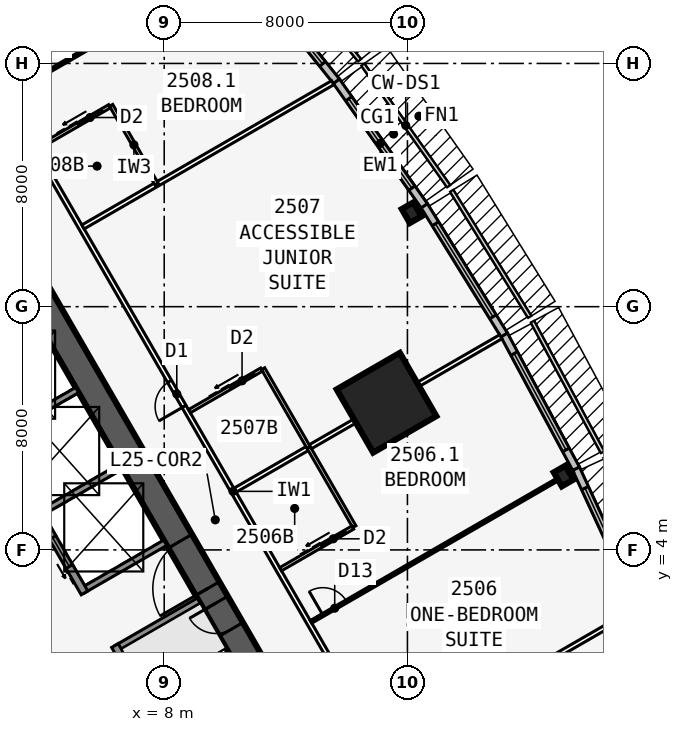
"""IFC4 building model, lengths in metres.
Left out: names, types, materials, properties, quantities, classifications, styles, units other than length and angle.
Written with IfcOpenShell. Run it as: python <this file> out.ifc"""

import sys

from ifc_helpers import new_model, si_unit, direction, frame, frame_2d, origin, origin_2d, place, context, subcontext, project, spatial, rectangle, i_section, extrude, element, fill, save


model = new_model("IFC4")
c1 = context("Model", 3, precision=1e-05, world=origin(), true_north=direction((0.0, 1.0)))
c2 = subcontext(c1, "Body", "Model", "MODEL_VIEW")
j1 = project(units=[si_unit("LENGTHUNIT", "METRE"), si_unit("PLANEANGLEUNIT", "RADIAN")], contexts=[c1])
p1 = place(None, origin())
s1 = spatial("IfcSite", under=j1, at=p1, CompositionType="ELEMENT")
p2 = place(p1, origin())
s2 = spatial("IfcBuilding", under=s1, at=p2, CompositionType="ELEMENT")
p3 = place(p2, frame((0.0, 0.0, 96.5)))
s3 = spatial("IfcBuildingStorey", under=s2, at=p3, CompositionType="ELEMENT", Elevation=96.5)
p4 = place(p3, frame((16.5, -9.526, 0.0), z_axis=(0.0, 0.0, 1.0), x_axis=(-0.499999749417, 0.866025548458, 0.0)))
e1 = element("IfcWall", 1, at=p4, inside=s3, PredefinedType="SHEAR", context=c2, shape_type="SweptSolid", body=[
    extrude(rectangle(XDim=33.0, YDim=0.9, at=frame_2d((16.5, 0.0))), origin(), (0.0, 0.0, 1.0), 3.4),
])
p5 = place(p4, frame((14.15, 0.0, 0.0)))
e2 = element("IfcOpeningElement", 2, at=p5, cuts=e1, PredefinedType="OPENING", context=c2, shape_type="SweptSolid", body=[
    extrude(rectangle(XDim=1.8, YDim=2.13, at=frame_2d((0.9, 1.065))), frame((0.0, 0.46, 0.0), z_axis=(0.0, -1.0, 0.0), x_axis=(1.0, 0.0, 0.0)), (0.0, 0.0, 1.0), 0.92),
])
p6 = place(p4, frame((12.6, 0.0, 0.0)))
e3 = element("IfcOpeningElement", 3, at=p6, cuts=e1, PredefinedType="OPENING", context=c2, shape_type="SweptSolid", body=[
    extrude(rectangle(XDim=1.0, YDim=2.13, at=frame_2d((0.5, 1.065))), frame((0.0, 0.46, 0.0), z_axis=(0.0, -1.0, 0.0), x_axis=(1.0, 0.0, 0.0)), (0.0, 0.0, 1.0), 0.92),
])
p7 = place(p3, frame((10.245, -5.843, 0.0), z_axis=(0.0, 0.0, 1.0), x_axis=(-0.499993009313, 0.866029439822, 0.0)))
e4 = element("IfcWall", 4, at=p7, inside=s3, PredefinedType="SOLIDWALL", context=c2, shape_type="SweptSolid", body=[
    extrude(rectangle(XDim=7.733, YDim=0.25, at=frame_2d((3.866, 0.0))), origin(), (0.0, 0.0, 1.0), 3.235),
])
p8 = place(p3, frame((5.379, 2.586, 0.0), z_axis=(0.0, 0.0, 1.0), x_axis=(-0.500001375892, 0.866024609411, 0.0)))
e5 = element("IfcWall", 5, at=p8, inside=s3, PredefinedType="SOLIDWALL", context=c2, shape_type="SweptSolid", body=[
    extrude(rectangle(XDim=10.633, YDim=0.25, at=frame_2d((5.316, 0.0))), origin(), (0.0, 0.0, 1.0), 3.235),
])
p9 = place(p8, frame((9.164, 0.0, 0.0)))
e6 = element("IfcOpeningElement", 6, at=p9, cuts=e5, PredefinedType="OPENING", context=c2, shape_type="SweptSolid", body=[
    extrude(rectangle(XDim=0.9, YDim=2.13, at=frame_2d((0.45, 1.065))), frame((0.0, 0.135, 0.0), z_axis=(0.0, -1.0, 0.0), x_axis=(1.0, 0.0, 0.0)), (0.0, 0.0, 1.0), 0.27),
])
p10 = place(p8, frame((1.0, 0.0, 0.0)))
e7 = element("IfcOpeningElement", 7, at=p10, cuts=e5, PredefinedType="OPENING", context=c2, shape_type="SweptSolid", body=[
    extrude(rectangle(XDim=1.1, YDim=2.13, at=frame_2d((0.55, 1.065))), frame((0.0, 0.135, 0.0), z_axis=(0.0, -1.0, 0.0), x_axis=(1.0, 0.0, 0.0)), (0.0, 0.0, 1.0), 0.27),
])
p11 = place(p8, frame((3.9, 0.0, 0.0)))
e8 = element("IfcOpeningElement", 8, at=p11, cuts=e5, PredefinedType="OPENING", context=c2, shape_type="SweptSolid", body=[
    extrude(rectangle(XDim=1.1, YDim=2.13, at=frame_2d((0.55, 1.065))), frame((0.0, 0.135, 0.0), z_axis=(0.0, -1.0, 0.0), x_axis=(1.0, 0.0, 0.0)), (0.0, 0.0, 1.0), 0.27),
])
p12 = place(p8, frame((6.8, 0.0, 0.0)))
e9 = element("IfcOpeningElement", 9, at=p12, cuts=e5, PredefinedType="OPENING", context=c2, shape_type="SweptSolid", body=[
    extrude(rectangle(XDim=1.1, YDim=2.13, at=frame_2d((0.55, 1.065))), frame((0.0, 0.135, 0.0), z_axis=(0.0, -1.0, 0.0), x_axis=(1.0, 0.0, 0.0)), (0.0, 0.0, 1.0), 0.27),
])
for number, where, z_axis, x_axis in (
    (10, (6.429, 0.767, 0.0), (0.0, 0.0, 1.0), (0.866, 0.5, 0.0)),
    (11, (5.329, 2.673, 0.0), (0.0, 0.0, 1.0), (0.866, 0.5, 0.0)),
    (12, (3.879, 5.184, 0.0), (0.0, 0.0, 1.0), (0.866, 0.5, 0.0)),
    (13, (2.429, 7.696, 0.0), (0.0, 0.0, 1.0), (0.866, 0.5, 0.0)),
):
    element("IfcWall", number, at=place(p3, frame(where, z_axis=z_axis, x_axis=x_axis)), inside=s3, PredefinedType="SOLIDWALL", context=c2, shape_type="SweptSolid", body=[
        extrude(rectangle(XDim=3.125, YDim=0.2, at=frame_2d((1.562, 0.0))), origin(), (0.0, 0.0, 1.0), 3.235),
    ])
for number, where, z_axis, x_axis in (
    (14, (21.137, 6.43, 0.0), (0.0, 0.0, 1.0), (0.866, 0.5, 0.0)),
    (15, (16.137, 15.09, 0.0), (0.0, 0.0, 1.0), (0.866, 0.5, 0.0)),
):
    element("IfcColumn", number, at=place(p3, frame(where, z_axis=z_axis, x_axis=x_axis)), inside=s3, PredefinedType="COLUMN", context=c2, shape_type="SweptSolid", body=[
        extrude(i_section(OverallWidth=0.442, OverallDepth=0.531, WebThickness=0.066, FlangeThickness=0.106, at=origin_2d()), origin(), (0.0, 0.0, 1.0), 3.4),
    ])
p13 = place(p3, frame((15.312, 8.84, 0.0), z_axis=(0.0, 0.0, 1.0), x_axis=(0.866025403784, 0.5, 0.0)))
e16 = element("IfcColumn", 16, at=p13, inside=s3, PredefinedType="COLUMN", context=c2, shape_type="SweptSolid", body=[
    extrude(rectangle(XDim=2.4, YDim=2.4, at=origin_2d()), origin(), (0.0, 0.0, 1.0), 3.4),
])
p14 = place(p3, frame((23.648, 2.119, 0.0), z_axis=(0.0, 0.0, 1.0), x_axis=(-0.419203100754, 0.907892482796, 0.0)))
e17 = element("IfcWall", 17, at=p14, inside=s3, PredefinedType="STANDARD", context=c2, shape_type="SweptSolid", body=[
    extrude(rectangle(XDim=5.021, YDim=0.25, at=frame_2d((2.51, 0.0))), origin(), (0.0, 0.0, 1.0), 3.235),
])
p15 = place(p14, frame((0.71, 0.0, 0.45)))
e18 = element("IfcOpeningElement", 18, at=p15, cuts=e17, PredefinedType="OPENING", context=c2, shape_type="SweptSolid", body=[
    extrude(rectangle(XDim=3.6, YDim=2.4, at=frame_2d((1.8, 1.2))), frame((0.0, 0.135, 0.0), z_axis=(0.0, -1.0, 0.0), x_axis=(1.0, 0.0, 0.0)), (0.0, 0.0, 1.0), 0.27),
])
p16 = place(p3, frame((21.547, 6.671, 0.0), z_axis=(0.0, 0.0, 1.0), x_axis=(-0.473412820489, 0.880840678782, 0.0)))
e19 = element("IfcWall", 19, at=p16, inside=s3, PredefinedType="STANDARD", context=c2, shape_type="SweptSolid", body=[
    extrude(rectangle(XDim=5.002, YDim=0.25, at=frame_2d((2.501, 0.0))), origin(), (0.0, 0.0, 1.0), 3.235),
])
p17 = place(p16, frame((0.701, 0.0, 0.45)))
e20 = element("IfcOpeningElement", 20, at=p17, cuts=e19, PredefinedType="OPENING", context=c2, shape_type="SweptSolid", body=[
    extrude(rectangle(XDim=3.6, YDim=2.4, at=frame_2d((1.8, 1.2))), frame((0.0, 0.135, 0.0), z_axis=(0.0, -1.0, 0.0), x_axis=(1.0, 0.0, 0.0)), (0.0, 0.0, 1.0), 0.27),
])
p18 = place(p3, frame((19.182, 11.071, 0.0), z_axis=(0.0, 0.0, 1.0), x_axis=(-0.526132807704, 0.850402415717, 0.0)))
e21 = element("IfcWall", 21, at=p18, inside=s3, PredefinedType="STANDARD", context=c2, shape_type="SweptSolid", body=[
    extrude(rectangle(XDim=5.002, YDim=0.25, at=frame_2d((2.501, 0.0))), origin(), (0.0, 0.0, 1.0), 3.235),
])
p19 = place(p18, frame((0.701, 0.0, 0.45)))
e22 = element("IfcOpeningElement", 22, at=p19, cuts=e21, PredefinedType="OPENING", context=c2, shape_type="SweptSolid", body=[
    extrude(rectangle(XDim=3.6, YDim=2.4, at=frame_2d((1.8, 1.2))), frame((0.0, 0.135, 0.0), z_axis=(0.0, -1.0, 0.0), x_axis=(1.0, 0.0, 0.0)), (0.0, 0.0, 1.0), 0.27),
])
p20 = place(p3, frame((16.555, 15.318, 0.0), z_axis=(0.0, 0.0, 1.0), x_axis=(-0.5766431066, 0.81699616132, 0.0)))
e23 = element("IfcWall", 23, at=p20, inside=s3, PredefinedType="STANDARD", context=c2, shape_type="SweptSolid", body=[
    extrude(rectangle(XDim=5.021, YDim=0.25, at=frame_2d((2.51, 0.0))), origin(), (0.0, 0.0, 1.0), 3.235),
])
p21 = place(p20, frame((0.71, 0.0, 0.45)))
e24 = element("IfcOpeningElement", 24, at=p21, cuts=e23, PredefinedType="OPENING", context=c2, shape_type="SweptSolid", body=[
    extrude(rectangle(XDim=3.6, YDim=2.4, at=frame_2d((1.8, 1.2))), frame((0.0, 0.135, 0.0), z_axis=(0.0, -1.0, 0.0), x_axis=(1.0, 0.0, 0.0)), (0.0, 0.0, 1.0), 0.27),
])
p22 = place(p3, frame((13.664, 19.414, 0.0), z_axis=(0.0, 0.0, 1.0), x_axis=(-0.624594965756, 0.780948864364, 0.0)))
e25 = element("IfcWall", 25, at=p22, inside=s3, PredefinedType="STANDARD", context=c2, shape_type="SweptSolid", body=[
    extrude(rectangle(XDim=5.058, YDim=0.25, at=frame_2d((2.529, 0.0))), origin(), (0.0, 0.0, 1.0), 3.235),
])
p23 = place(p22, frame((0.729, 0.0, 0.45)))
e26 = element("IfcOpeningElement", 26, at=p23, cuts=e25, PredefinedType="OPENING", context=c2, shape_type="SweptSolid", body=[
    extrude(rectangle(XDim=3.6, YDim=2.4, at=frame_2d((1.8, 1.2))), frame((0.0, 0.135, 0.0), z_axis=(0.0, -1.0, 0.0), x_axis=(1.0, 0.0, 0.0)), (0.0, 0.0, 1.0), 0.27),
])
p24 = place(p3, frame((20.027, -10.985, 0.0), z_axis=(0.0, 0.0, 1.0), x_axis=(-0.500001677587, 0.866024435227, 0.0)))
e27 = element("IfcWall", 27, at=p24, inside=s3, PredefinedType="PARTITIONING", context=c2, shape_type="SweptSolid", body=[
    extrude(rectangle(XDim=39.054, YDim=0.15, at=frame_2d((19.527, 0.0))), origin(), (0.0, 0.0, 1.0), 3.235),
])
p25 = place(p24, frame((1.558, 0.0, 0.0)))
e28 = element("IfcOpeningElement", 28, at=p25, cuts=e27, PredefinedType="OPENING", context=c2, shape_type="SweptSolid", body=[
    extrude(rectangle(XDim=0.95, YDim=2.13, at=frame_2d((0.475, 1.065))), frame((0.0, 0.085, 0.0), z_axis=(0.0, -1.0, 0.0), x_axis=(1.0, 0.0, 0.0)), (0.0, 0.0, 1.0), 0.17),
])
p26 = place(p24, frame((11.552, 0.0, 0.0)))
e29 = element("IfcOpeningElement", 29, at=p26, cuts=e27, PredefinedType="OPENING", context=c2, shape_type="SweptSolid", body=[
    extrude(rectangle(XDim=0.95, YDim=2.13, at=frame_2d((0.475, 1.065))), frame((0.0, 0.085, 0.0), z_axis=(0.0, -1.0, 0.0), x_axis=(1.0, 0.0, 0.0)), (0.0, 0.0, 1.0), 0.17),
])
p27 = place(p24, frame((22.752, 0.0, 0.0)))
e30 = element("IfcOpeningElement", 30, at=p27, cuts=e27, PredefinedType="OPENING", context=c2, shape_type="SweptSolid", body=[
    extrude(rectangle(XDim=0.95, YDim=2.13, at=frame_2d((0.475, 1.065))), frame((0.0, 0.085, 0.0), z_axis=(0.0, -1.0, 0.0), x_axis=(1.0, 0.0, 0.0)), (0.0, 0.0, 1.0), 0.17),
])
p28 = place(p24, frame((36.546, 0.0, 0.0)))
e31 = element("IfcOpeningElement", 31, at=p28, cuts=e27, PredefinedType="OPENING", context=c2, shape_type="SweptSolid", body=[
    extrude(rectangle(XDim=0.95, YDim=2.13, at=frame_2d((0.475, 1.065))), frame((0.0, 0.085, 0.0), z_axis=(0.0, -1.0, 0.0), x_axis=(1.0, 0.0, 0.0)), (0.0, 0.0, 1.0), 0.17),
])
p29 = place(p3, frame((15.329, -2.697, 0.0), z_axis=(0.0, 0.0, 1.0), x_axis=(0.866018409083, 0.500012114982, 0.0)))
e32 = element("IfcWall", 32, at=p29, inside=s3, PredefinedType="PARTITIONING", context=c2, shape_type="SweptSolid", body=[
    extrude(rectangle(XDim=9.485, YDim=0.15, at=frame_2d((4.742, 0.0))), origin(), (0.0, 0.0, 1.0), 2.389),
])
p30 = place(p3, frame((12.829, 1.633, 0.0), z_axis=(0.0, 0.0, 1.0), x_axis=(0.866026934769, 0.499997348248, 0.0)))
e33 = element("IfcWall", 33, at=p30, inside=s3, PredefinedType="PARTITIONING", context=c2, shape_type="SweptSolid", body=[
    extrude(rectangle(XDim=9.943, YDim=0.1, at=frame_2d((4.971, 0.0))), origin(), (0.0, 0.0, 1.0), 2.389),
])
p31 = place(p30, frame((0.45, 0.0, 0.0)))
e34 = element("IfcOpeningElement", 34, at=p31, cuts=e33, PredefinedType="OPENING", context=c2, shape_type="SweptSolid", body=[
    extrude(rectangle(XDim=0.9, YDim=2.13, at=frame_2d((0.45, 1.065))), frame((0.0, 0.06, 0.0), z_axis=(0.0, -1.0, 0.0), x_axis=(1.0, 0.0, 0.0)), (0.0, 0.0, 1.0), 0.12),
])
p32 = place(p3, frame((10.329, 5.963, 0.0), z_axis=(0.0, 0.0, 1.0), x_axis=(0.866021688545, 0.500006434927, 0.0)))
e35 = element("IfcWall", 35, at=p32, inside=s3, PredefinedType="PARTITIONING", context=c2, shape_type="SweptSolid", body=[
    extrude(rectangle(XDim=10.096, YDim=0.15, at=frame_2d((5.048, 0.0))), origin(), (0.0, 0.0, 1.0), 2.389),
])
p33 = place(p3, frame((5.329, 14.623, 0.0), z_axis=(0.0, 0.0, 1.0), x_axis=(0.866018409083, 0.500012114982, 0.0)))
e36 = element("IfcWall", 36, at=p33, inside=s3, PredefinedType="PARTITIONING", context=c2, shape_type="SweptSolid", body=[
    extrude(rectangle(XDim=9.485, YDim=0.15, at=frame_2d((4.742, 0.0))), origin(), (0.0, 0.0, 1.0), 2.389),
])
p34 = place(p3, frame((2.829, 18.954, 0.0), z_axis=(0.0, 0.0, 1.0), x_axis=(0.866020536561, 0.500008430184, 0.0)))
e37 = element("IfcWall", 37, at=p34, inside=s3, PredefinedType="PARTITIONING", context=c2, shape_type="SweptSolid", body=[
    extrude(rectangle(XDim=8.72, YDim=0.1, at=frame_2d((4.36, 0.0))), origin(), (0.0, 0.0, 1.0), 2.389),
])
p35 = place(p34, frame((0.45, 0.0, 0.0)))
e38 = element("IfcOpeningElement", 38, at=p35, cuts=e37, PredefinedType="OPENING", context=c2, shape_type="SweptSolid", body=[
    extrude(rectangle(XDim=0.9, YDim=2.13, at=frame_2d((0.45, 1.065))), frame((0.0, 0.06, 0.0), z_axis=(0.0, -1.0, 0.0), x_axis=(1.0, 0.0, 0.0)), (0.0, 0.0, 1.0), 0.12),
])
p36 = place(p3, frame((14.253, 4.765, 0.0), z_axis=(0.0, 0.0, 1.0), x_axis=(-0.50002537861, 0.866010750942, 0.0)))
e39 = element("IfcWall", 39, at=p36, inside=s3, PredefinedType="PLUMBINGWALL", context=c2, shape_type="SweptSolid", body=[
    extrude(rectangle(XDim=3.0, YDim=0.12, at=frame_2d((1.5, 0.0))), origin(), (0.0, 0.0, 1.0), 3.235),
])
p37 = place(p3, frame((11.829, 3.365, 0.0), z_axis=(0.0, 0.0, 1.0), x_axis=(0.865997131366, 0.500048966069, 0.0)))
e40 = element("IfcWall", 40, at=p37, inside=s3, PredefinedType="PLUMBINGWALL", context=c2, shape_type="SweptSolid", body=[
    extrude(rectangle(XDim=2.74, YDim=0.12, at=frame_2d((1.37, 0.0))), origin(), (0.0, 0.0, 1.0), 3.235),
])
p38 = place(p37, frame((1.55, 0.0, 0.0)))
e41 = element("IfcOpeningElement", 41, at=p38, cuts=e40, PredefinedType="OPENING", context=c2, shape_type="SweptSolid", body=[
    extrude(rectangle(XDim=0.9, YDim=2.13, at=frame_2d((0.45, 1.065))), frame((0.0, 0.07, 0.0), z_axis=(0.0, -1.0, 0.0), x_axis=(1.0, 0.0, 0.0)), (0.0, 0.0, 1.0), 0.14),
])
p39 = place(p3, frame((12.753, 7.363, 0.0), z_axis=(0.0, 0.0, 1.0), x_axis=(-0.499990139034, 0.866031096941, 0.0)))
e42 = element("IfcWall", 42, at=p39, inside=s3, PredefinedType="PLUMBINGWALL", context=c2, shape_type="SweptSolid", body=[
    extrude(rectangle(XDim=3.0, YDim=0.12, at=frame_2d((1.5, 0.0))), origin(), (0.0, 0.0, 1.0), 3.235),
])
p40 = place(p3, frame((8.829, 8.561, 0.0), z_axis=(0.0, 0.0, 1.0), x_axis=(0.866035715982, 0.499982138324, 0.0)))
e43 = element("IfcWall", 43, at=p40, inside=s3, PredefinedType="PLUMBINGWALL", context=c2, shape_type="SweptSolid", body=[
    extrude(rectangle(XDim=2.74, YDim=0.12, at=frame_2d((1.37, 0.0))), origin(), (0.0, 0.0, 1.0), 3.235),
])
p41 = place(p40, frame((1.55, 0.0, 0.0)))
e44 = element("IfcOpeningElement", 44, at=p41, cuts=e43, PredefinedType="OPENING", context=c2, shape_type="SweptSolid", body=[
    extrude(rectangle(XDim=0.9, YDim=2.13, at=frame_2d((0.45, 1.065))), frame((0.0, 0.07, 0.0), z_axis=(0.0, -1.0, 0.0), x_axis=(1.0, 0.0, 0.0)), (0.0, 0.0, 1.0), 0.14),
])
p42 = place(p3, frame((7.753, 16.023, 0.0), z_axis=(0.0, 0.0, 1.0), x_axis=(-0.499990139034, 0.866031096941, 0.0)))
e45 = element("IfcWall", 45, at=p42, inside=s3, PredefinedType="PLUMBINGWALL", context=c2, shape_type="SweptSolid", body=[
    extrude(rectangle(XDim=3.0, YDim=0.12, at=frame_2d((1.5, 0.0))), origin(), (0.0, 0.0, 1.0), 3.235),
])
p43 = place(p3, frame((3.829, 17.221, 0.0), z_axis=(0.0, 0.0, 1.0), x_axis=(0.865997131366, 0.500048966069, 0.0)))
e46 = element("IfcWall", 46, at=p43, inside=s3, PredefinedType="PLUMBINGWALL", context=c2, shape_type="SweptSolid", body=[
    extrude(rectangle(XDim=2.74, YDim=0.12, at=frame_2d((1.37, 0.0))), origin(), (0.0, 0.0, 1.0), 3.235),
])
p44 = place(p43, frame((1.55, 0.0, 0.0)))
e47 = element("IfcOpeningElement", 47, at=p44, cuts=e46, PredefinedType="OPENING", context=c2, shape_type="SweptSolid", body=[
    extrude(rectangle(XDim=0.9, YDim=2.13, at=frame_2d((0.45, 1.065))), frame((0.0, 0.07, 0.0), z_axis=(0.0, -1.0, 0.0), x_axis=(1.0, 0.0, 0.0)), (0.0, 0.0, 1.0), 0.14),
])
p45 = place(p15, origin())
e48 = element("IfcWindow", 48, at=p45, inside=s3, PartitioningType="SINGLE_PANEL", PredefinedType="WINDOW", context=c2, shape_type="SweptSolid", body=[
    extrude(rectangle(XDim=3.6, YDim=2.4, at=frame_2d((1.8, 1.2))), frame((0.0, 0.03, 0.0), z_axis=(0.0, -1.0, 0.0), x_axis=(1.0, 0.0, 0.0)), (0.0, 0.0, 1.0), 0.06),
])
fill(e18, e48)
p46 = place(p17, origin())
e49 = element("IfcWindow", 49, at=p46, inside=s3, PartitioningType="SINGLE_PANEL", PredefinedType="WINDOW", context=c2, shape_type="SweptSolid", body=[
    extrude(rectangle(XDim=3.6, YDim=2.4, at=frame_2d((1.8, 1.2))), frame((0.0, 0.03, 0.0), z_axis=(0.0, -1.0, 0.0), x_axis=(1.0, 0.0, 0.0)), (0.0, 0.0, 1.0), 0.06),
])
fill(e20, e49)
p47 = place(p19, origin())
e50 = element("IfcWindow", 50, at=p47, inside=s3, PartitioningType="SINGLE_PANEL", PredefinedType="WINDOW", context=c2, shape_type="SweptSolid", body=[
    extrude(rectangle(XDim=3.6, YDim=2.4, at=frame_2d((1.8, 1.2))), frame((0.0, 0.03, 0.0), z_axis=(0.0, -1.0, 0.0), x_axis=(1.0, 0.0, 0.0)), (0.0, 0.0, 1.0), 0.06),
])
fill(e22, e50)
p48 = place(p21, origin())
e51 = element("IfcWindow", 51, at=p48, inside=s3, PartitioningType="SINGLE_PANEL", PredefinedType="WINDOW", context=c2, shape_type="SweptSolid", body=[
    extrude(rectangle(XDim=3.6, YDim=2.4, at=frame_2d((1.8, 1.2))), frame((0.0, 0.03, 0.0), z_axis=(0.0, -1.0, 0.0), x_axis=(1.0, 0.0, 0.0)), (0.0, 0.0, 1.0), 0.06),
])
fill(e24, e51)
p49 = place(p23, origin())
e52 = element("IfcWindow", 52, at=p49, inside=s3, PartitioningType="SINGLE_PANEL", PredefinedType="WINDOW", context=c2, shape_type="SweptSolid", body=[
    extrude(rectangle(XDim=3.6, YDim=2.4, at=frame_2d((1.8, 1.2))), frame((0.0, 0.03, 0.0), z_axis=(0.0, -1.0, 0.0), x_axis=(1.0, 0.0, 0.0)), (0.0, 0.0, 1.0), 0.06),
])
fill(e26, e52)
p50 = place(p31, origin())
e53 = element("IfcDoor", 53, at=p50, inside=s3, OperationType="SINGLE_SWING_LEFT", PredefinedType="DOOR", context=c2, shape_type="SweptSolid", body=[
    extrude(rectangle(XDim=0.9, YDim=2.13, at=frame_2d((0.45, 1.065))), frame((0.0, 0.025, 0.0), z_axis=(0.0, -1.0, 0.0), x_axis=(1.0, 0.0, 0.0)), (0.0, 0.0, 1.0), 0.05),
])
fill(e34, e53)
p51 = place(p38, origin())
e54 = element("IfcDoor", 54, at=p51, inside=s3, OperationType="SLIDING_TO_LEFT", PredefinedType="DOOR", context=c2, shape_type="SweptSolid", body=[
    extrude(rectangle(XDim=0.9, YDim=2.13, at=frame_2d((0.45, 1.065))), frame((0.0, 0.025, 0.0), z_axis=(0.0, -1.0, 0.0), x_axis=(1.0, 0.0, 0.0)), (0.0, 0.0, 1.0), 0.05),
])
fill(e41, e54)
p52 = place(p41, origin())
e55 = element("IfcDoor", 55, at=p52, inside=s3, OperationType="SLIDING_TO_LEFT", PredefinedType="DOOR", context=c2, shape_type="SweptSolid", body=[
    extrude(rectangle(XDim=0.9, YDim=2.13, at=frame_2d((0.45, 1.065))), frame((0.0, 0.025, 0.0), z_axis=(0.0, -1.0, 0.0), x_axis=(1.0, 0.0, 0.0)), (0.0, 0.0, 1.0), 0.05),
])
fill(e44, e55)
p53 = place(p27, origin())
e56 = element("IfcDoor", 56, at=p53, inside=s3, OperationType="SINGLE_SWING_LEFT", PredefinedType="DOOR", context=c2, shape_type="SweptSolid", body=[
    extrude(rectangle(XDim=0.95, YDim=2.13, at=frame_2d((0.475, 1.065))), frame((0.0, 0.025, 0.0), z_axis=(0.0, -1.0, 0.0), x_axis=(1.0, 0.0, 0.0)), (0.0, 0.0, 1.0), 0.05),
])
fill(e30, e56)
p54 = place(p44, origin())
e57 = element("IfcDoor", 57, at=p54, inside=s3, OperationType="SLIDING_TO_LEFT", PredefinedType="DOOR", context=c2, shape_type="SweptSolid", body=[
    extrude(rectangle(XDim=0.9, YDim=2.13, at=frame_2d((0.45, 1.065))), frame((0.0, 0.025, 0.0), z_axis=(0.0, -1.0, 0.0), x_axis=(1.0, 0.0, 0.0)), (0.0, 0.0, 1.0), 0.05),
])
fill(e47, e57)
p55 = place(p5, origin())
e58 = element("IfcDoor", 58, at=p55, inside=s3, OperationType="DOUBLE_DOOR_SINGLE_SWING", PredefinedType="DOOR", context=c2, shape_type="SweptSolid", body=[
    extrude(rectangle(XDim=1.8, YDim=2.13, at=frame_2d((0.9, 1.065))), frame((0.0, 0.025, 0.0), z_axis=(0.0, -1.0, 0.0), x_axis=(1.0, 0.0, 0.0)), (0.0, 0.0, 1.0), 0.05),
])
fill(e2, e58)
p56 = place(p6, origin())
e59 = element("IfcDoor", 59, at=p56, inside=s3, OperationType="SINGLE_SWING_RIGHT", PredefinedType="DOOR", context=c2, shape_type="SweptSolid", body=[
    extrude(rectangle(XDim=1.0, YDim=2.13, at=frame_2d((0.5, 1.065))), frame((0.0, 0.025, 0.0), z_axis=(0.0, -1.0, 0.0), x_axis=(1.0, 0.0, 0.0)), (0.0, 0.0, 1.0), 0.05),
])
fill(e3, e59)
p57 = place(p10, origin())
e60 = element("IfcDoor", 60, at=p57, inside=s3, OperationType="DOUBLE_DOOR_SLIDING", PredefinedType="USERDEFINED", context=c2, shape_type="SweptSolid", body=[
    extrude(rectangle(XDim=1.1, YDim=2.13, at=frame_2d((0.55, 1.065))), frame((0.0, 0.025, 0.0), z_axis=(0.0, -1.0, 0.0), x_axis=(1.0, 0.0, 0.0)), (0.0, 0.0, 1.0), 0.05),
])
fill(e7, e60)
save(model, sys.argv[1])
